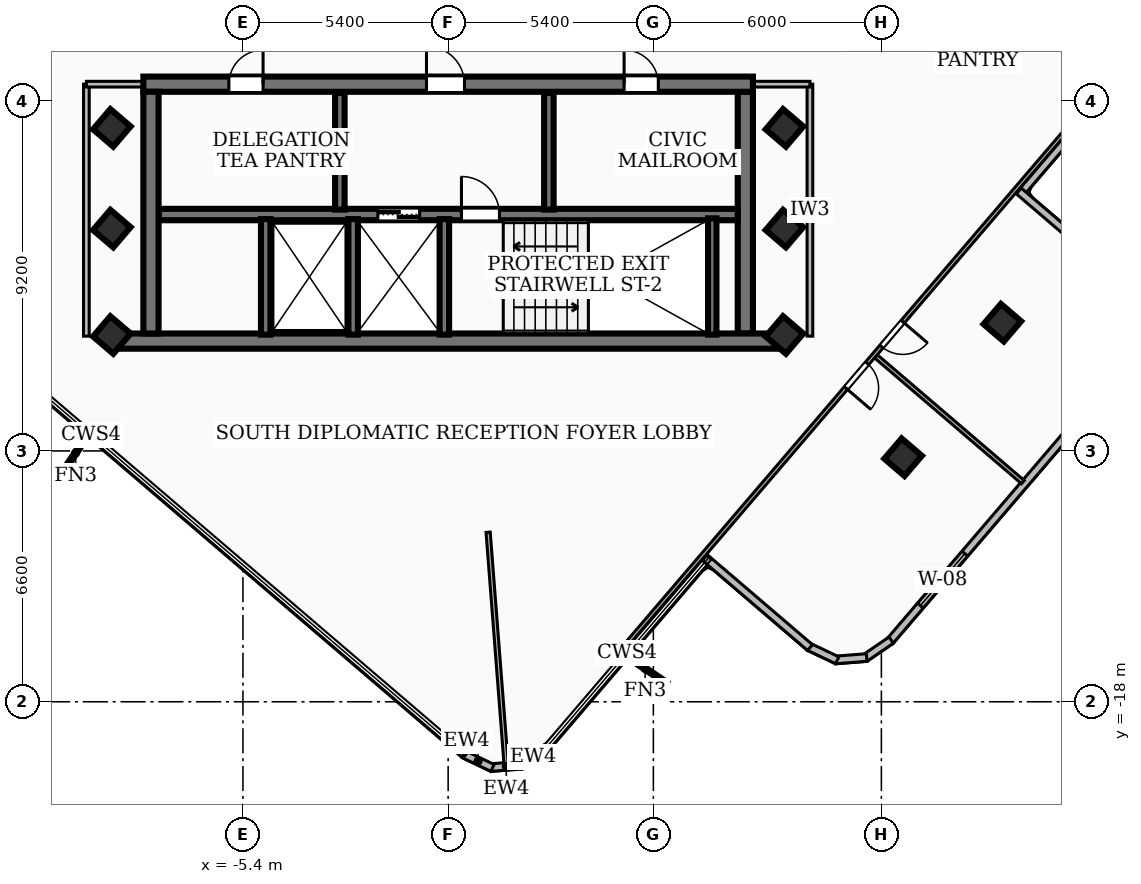
"""IFC4 building model, lengths in metres.
Left out: names, types, materials, properties, quantities, classifications, styles, units other than length and angle.
Written with IfcOpenShell. Run it as: python <this file> out.ifc"""

import sys

from ifc_helpers import new_model, si_unit, direction, frame, frame_2d, origin, origin_2d, place, context, subcontext, project, spatial, rectangle, extrude, element, fill, save


model = new_model("IFC4")
c1 = context("Model", 3, precision=1e-05, world=origin(), true_north=direction((0.0, 1.0)))
c2 = subcontext(c1, "Body", "Model", "MODEL_VIEW")
j1 = project(units=[si_unit("LENGTHUNIT", "METRE"), si_unit("PLANEANGLEUNIT", "RADIAN")], contexts=[c1])
p1 = place(None, origin())
s1 = spatial("IfcSite", under=j1, at=p1, CompositionType="ELEMENT")
p2 = place(p1, origin())
s2 = spatial("IfcBuilding", under=s1, at=p2, CompositionType="ELEMENT")
p3 = place(p2, frame((0.0, 0.0, 250.92)))
s3 = spatial("IfcBuildingStorey", under=s2, at=p3, CompositionType="ELEMENT", Elevation=250.92)
p4 = place(p3, frame((8.78, -8.51, 0.0), z_axis=(0.0, 0.0, 1.0), x_axis=(-1.0, 0.0, 0.0)))
e1 = element("IfcWall", 1, at=p4, inside=s3, PredefinedType="SHEAR", context=c2, shape_type="SweptSolid", body=[
    extrude(rectangle(XDim=17.56, YDim=0.4, at=frame_2d((8.78, 0.0))), origin(), (0.0, 0.0, 1.0), 3.16),
])
p5 = place(p3, frame((-8.02, -1.75, 0.0), z_axis=(0.0, 0.0, 1.0), x_axis=(1.0, 0.0, 0.0)))
e2 = element("IfcWall", 2, at=p5, inside=s3, PredefinedType="SHEAR", context=c2, shape_type="SweptSolid", body=[
    extrude(rectangle(XDim=16.04, YDim=0.4, at=frame_2d((8.02, 0.0))), origin(), (0.0, 0.0, 1.0), 3.16),
])
p6 = place(p5, frame((7.45, 0.0, 0.0)))
e3 = element("IfcOpeningElement", 3, at=p6, cuts=e2, PredefinedType="OPENING", context=c2, shape_type="SweptSolid", body=[
    extrude(rectangle(XDim=1.0, YDim=2.1, at=frame_2d((0.5, 1.05))), frame((0.0, 0.21, 0.0), z_axis=(0.0, -1.0, 0.0), x_axis=(1.0, 0.0, 0.0)), (0.0, 0.0, 1.0), 0.42),
])
p7 = place(p5, frame((12.65, 0.0, 0.0)))
e4 = element("IfcOpeningElement", 4, at=p7, cuts=e2, PredefinedType="OPENING", context=c2, shape_type="SweptSolid", body=[
    extrude(rectangle(XDim=0.9, YDim=2.06, at=frame_2d((0.45, 1.03))), frame((0.0, 0.21, 0.0), z_axis=(0.0, -1.0, 0.0), x_axis=(1.0, 0.0, 0.0)), (0.0, 0.0, 1.0), 0.42),
])
p8 = place(p5, frame((2.25, 0.0, 0.0)))
e5 = element("IfcOpeningElement", 5, at=p8, cuts=e2, PredefinedType="OPENING", context=c2, shape_type="SweptSolid", body=[
    extrude(rectangle(XDim=0.9, YDim=2.06, at=frame_2d((0.45, 1.03))), frame((0.0, 0.21, 0.0), z_axis=(0.0, -1.0, 0.0), x_axis=(1.0, 0.0, 0.0)), (0.0, 0.0, 1.0), 0.42),
])
for number, where, z_axis, x_axis in (
    (6, (-7.82, -8.31, 0.0), (0.0, 0.0, 1.0), (0.0, 1.0, 0.0)),
    (7, (7.82, -1.95, 0.0), (0.0, 0.0, 1.0), (0.0, -1.0, 0.0)),
):
    element("IfcWall", number, at=place(p3, frame(where, z_axis=z_axis, x_axis=x_axis)), inside=s3, PredefinedType="SHEAR", context=c2, shape_type="SweptSolid", body=[
        extrude(rectangle(XDim=6.36, YDim=0.4, at=frame_2d((3.18, 0.0))), origin(), (0.0, 0.0, 1.0), 3.16),
    ])
p9 = place(p3, frame((-7.62, -5.18, 0.0), z_axis=(0.0, 0.0, 1.0), x_axis=(1.0, 0.0, 0.0)))
e8 = element("IfcWall", 8, at=p9, inside=s3, PredefinedType="SOLIDWALL", context=c2, shape_type="SweptSolid", body=[
    extrude(rectangle(XDim=15.24, YDim=0.3, at=frame_2d((7.62, 0.0))), origin(), (0.0, 0.0, 1.0), 3.16),
])
p10 = place(p9, frame((5.77, 0.0, 0.0)))
e9 = element("IfcOpeningElement", 9, at=p10, cuts=e8, PredefinedType="OPENING", context=c2, shape_type="SweptSolid", body=[
    extrude(rectangle(XDim=1.1, YDim=2.15, at=frame_2d((0.55, 1.075))), frame((0.0, 0.16, 0.0), z_axis=(0.0, -1.0, 0.0), x_axis=(1.0, 0.0, 0.0)), (0.0, 0.0, 1.0), 0.32),
])
p11 = place(p9, frame((7.97, 0.0, 0.0)))
e10 = element("IfcOpeningElement", 10, at=p11, cuts=e8, PredefinedType="OPENING", context=c2, shape_type="SweptSolid", body=[
    extrude(rectangle(XDim=1.0, YDim=2.1, at=frame_2d((0.5, 1.05))), frame((0.0, 0.16, 0.0), z_axis=(0.0, -1.0, 0.0), x_axis=(1.0, 0.0, 0.0)), (0.0, 0.0, 1.0), 0.32),
])
p12 = place(p3, frame((6.95, -8.34, 0.0), z_axis=(0.0, 0.0, 1.0), x_axis=(0.0, 1.0, 0.0)))
e11 = element("IfcWall", 11, at=p12, inside=s3, PredefinedType="SOLIDWALL", context=c2, shape_type="SweptSolid", body=[
    extrude(rectangle(XDim=3.06, YDim=0.22, at=frame_2d((1.53, 0.0))), origin(), (0.0, 0.0, 1.0), 3.16),
])
for number, where, z_axis, x_axis in (
    (12, (-0.1, -8.34, 0.0), (0.0, 0.0, 1.0), (0.0, 1.0, 0.0)),
    (13, (-2.5, -8.34, 0.0), (0.0, 0.0, 1.0), (0.0, 1.0, 0.0)),
    (14, (-4.8, -8.34, 0.0), (0.0, 0.0, 1.0), (0.0, 1.0, 0.0)),
):
    element("IfcWall", number, at=place(p3, frame(where, z_axis=z_axis, x_axis=x_axis)), inside=s3, PredefinedType="SOLIDWALL", context=c2, shape_type="SweptSolid", body=[
        extrude(rectangle(XDim=3.04, YDim=0.25, at=frame_2d((1.52, 0.0))), origin(), (0.0, 0.0, 1.0), 3.16),
    ])
for number, where, z_axis, x_axis in (
    (15, (-2.85, -5.05, 0.0), (0.0, 0.0, 1.0), (0.0, 1.0, 0.0)),
    (16, (2.65, -5.05, 0.0), (0.0, 0.0, 1.0), (0.0, 1.0, 0.0)),
):
    element("IfcWall", number, at=place(p3, frame(where, z_axis=z_axis, x_axis=x_axis)), inside=s3, PredefinedType="SOLIDWALL", context=c2, shape_type="SweptSolid", body=[
        extrude(rectangle(XDim=3.07, YDim=0.25, at=frame_2d((1.535, 0.0))), origin(), (0.0, 0.0, 1.0), 3.16),
    ])
for number, where, z_axis, x_axis in (
    (17, (-8.85, -5.55, 0.0), (0.0, 0.0, 1.0), (0.65, 0.76, 0.0)),
    (18, (-8.85, -2.9, 0.0), (0.0, 0.0, 1.0), (0.65, 0.76, 0.0)),
    (19, (8.85, -5.55, 0.0), (0.0, 0.0, 1.0), (0.65, 0.76, 0.0)),
    (20, (8.85, -2.9, 0.0), (0.0, 0.0, 1.0), (0.65, 0.76, 0.0)),
    (21, (8.85, -8.35, 0.0), (0.0, 0.0, 1.0), (0.65, 0.76, 0.0)),
    (22, (-8.85, -8.35, 0.0), (0.0, 0.0, 1.0), (0.65, 0.76, 0.0)),
    (23, (11.971, -11.566, 0.0), (0.0, 0.0, 1.0), (0.65, 0.76, 0.0)),
    (24, (14.583, -8.026, 0.0), (0.0, 0.0, 1.0), (0.65, 0.76, 0.0)),
):
    element("IfcColumn", number, at=place(p3, frame(where, z_axis=z_axis, x_axis=x_axis)), inside=s3, PredefinedType="COLUMN", context=c2, shape_type="SweptSolid", body=[
        extrude(rectangle(XDim=0.7, YDim=0.7, at=origin_2d()), origin(), (0.0, 0.0, 1.0), 3.42),
    ])
p13 = place(p3, frame((2.587, -19.21, 0.0), z_axis=(0.0, 0.0, 1.0), x_axis=(-0.824907237821, -0.565268121329, 0.0)))
e25 = element("IfcWall", 25, at=p13, inside=s3, PredefinedType="SOLIDWALL", context=c2, shape_type="SweptSolid", body=[
    extrude(rectangle(XDim=0.839, YDim=0.2, at=frame_2d((0.419, 0.0))), origin(), (0.0, 0.0, 1.0), 3.16),
])
p14 = place(p3, frame((1.941, -19.668, 0.0), z_axis=(0.0, 0.0, 1.0), x_axis=(-0.996986164412, -0.077579558977, 0.0)))
e26 = element("IfcWall", 26, at=p14, inside=s3, PredefinedType="SOLIDWALL", context=c2, shape_type="SweptSolid", body=[
    extrude(rectangle(XDim=0.824, YDim=0.2, at=frame_2d((0.412, 0.0))), origin(), (0.0, 0.0, 1.0), 3.16),
])
p15 = place(p3, frame((1.167, -19.741, 0.0), z_axis=(0.0, 0.0, 1.0), x_axis=(-0.902360330408, 0.430982405796, 0.0)))
e27 = element("IfcWall", 27, at=p15, inside=s3, PredefinedType="SOLIDWALL", context=c2, shape_type="SweptSolid", body=[
    extrude(rectangle(XDim=0.84, YDim=0.2, at=frame_2d((0.42, 0.0))), origin(), (0.0, 0.0, 1.0), 3.16),
])
p16 = place(p3, frame((19.406, 0.451, 0.0), z_axis=(0.0, 0.0, 1.0), x_axis=(-0.650185720357, -0.759775314842, 0.0)))
e28 = element("IfcWall", 28, at=p16, inside=s3, PredefinedType="SOLIDWALL", context=c2, shape_type="SweptSolid", body=[
    extrude(rectangle(XDim=6.741, YDim=0.2, at=frame_2d((3.371, 0.0))), origin(), (0.0, 0.0, 1.0), 3.16),
])
p17 = place(p3, frame((15.014, -4.558, 0.0), z_axis=(0.0, 0.0, 1.0), x_axis=(0.759781598798, -0.650178377161, 0.0)))
e29 = element("IfcWall", 29, at=p17, inside=s3, PredefinedType="SOLIDWALL", context=c2, shape_type="SweptSolid", body=[
    extrude(rectangle(XDim=3.642, YDim=0.2, at=frame_2d((1.821, 0.0))), origin(), (0.0, 0.0, 1.0), 3.16),
])
p18 = place(p3, frame((17.943, -9.024, 0.0), z_axis=(0.0, 0.0, 1.0), x_axis=(-0.650218389303, -0.759747356831, 0.0)))
e30 = element("IfcWall", 30, at=p18, inside=s3, PredefinedType="SOLIDWALL", context=c2, shape_type="SweptSolid", body=[
    extrude(rectangle(XDim=9.723, YDim=0.2, at=frame_2d((4.861, 0.0))), origin(), (0.0, 0.0, 1.0), 3.16),
])
p19 = place(p18, frame((6.684, 0.0, 0.85)))
e31 = element("IfcOpeningElement", 31, at=p19, cuts=e30, PredefinedType="OPENING", context=c2, shape_type="SweptSolid", body=[
    extrude(rectangle(XDim=1.8, YDim=1.8, at=frame_2d((0.9, 0.9))), frame((0.0, 0.11, 0.0), z_axis=(0.0, -1.0, 0.0), x_axis=(1.0, 0.0, 0.0)), (0.0, 0.0, 1.0), 0.22),
])
p20 = place(p3, frame((11.658, -16.378, 0.0), z_axis=(0.0, 0.0, 1.0), x_axis=(-0.824907237821, -0.565268121329, 0.0)))
e32 = element("IfcWall", 32, at=p20, inside=s3, PredefinedType="SOLIDWALL", context=c2, shape_type="SweptSolid", body=[
    extrude(rectangle(XDim=0.839, YDim=0.2, at=frame_2d((0.419, 0.0))), origin(), (0.0, 0.0, 1.0), 3.16),
])
p21 = place(p3, frame((11.012, -16.836, 0.0), z_axis=(0.0, 0.0, 1.0), x_axis=(-0.996986164412, -0.077579558977, 0.0)))
e33 = element("IfcWall", 33, at=p21, inside=s3, PredefinedType="SOLIDWALL", context=c2, shape_type="SweptSolid", body=[
    extrude(rectangle(XDim=0.824, YDim=0.2, at=frame_2d((0.412, 0.0))), origin(), (0.0, 0.0, 1.0), 3.16),
])
p22 = place(p3, frame((10.238, -16.909, 0.0), z_axis=(0.0, 0.0, 1.0), x_axis=(-0.902473334209, 0.430745726666, 0.0)))
e34 = element("IfcWall", 34, at=p22, inside=s3, PredefinedType="SOLIDWALL", context=c2, shape_type="SweptSolid", body=[
    extrude(rectangle(XDim=0.84, YDim=0.2, at=frame_2d((0.42, 0.0))), origin(), (0.0, 0.0, 1.0), 3.16),
])
p23 = place(p3, frame((9.522, -16.574, 0.0), z_axis=(0.0, 0.0, 1.0), x_axis=(-0.759914066759, 0.650023546606, 0.0)))
e35 = element("IfcWall", 35, at=p23, inside=s3, PredefinedType="SOLIDWALL", context=c2, shape_type="SweptSolid", body=[
    extrude(rectangle(XDim=3.641, YDim=0.2, at=frame_2d((1.821, 0.0))), origin(), (0.0, 0.0, 1.0), 3.16),
])
p24 = place(p3, frame((-9.52, -8.38, 0.0), z_axis=(0.0, 0.0, 1.0), x_axis=(0.0, 1.0, 0.0)))
e36 = element("IfcWall", 36, at=p24, inside=s3, PredefinedType="PARTITIONING", context=c2, shape_type="SweptSolid", body=[
    extrude(rectangle(XDim=6.63, YDim=0.15, at=frame_2d((3.315, 0.0))), origin(), (0.0, 0.0, 1.0), 3.16),
])
p25 = place(p3, frame((-7.85, -1.75, 0.0), z_axis=(0.0, 0.0, 1.0), x_axis=(-1.0, 0.0, 0.0)))
e37 = element("IfcWall", 37, at=p25, inside=s3, PredefinedType="PARTITIONING", context=c2, shape_type="SweptSolid", body=[
    extrude(rectangle(XDim=1.67, YDim=0.15, at=frame_2d((0.835, 0.0))), origin(), (0.0, 0.0, 1.0), 2.39),
])
p26 = place(p3, frame((9.52, -8.38, 0.0), z_axis=(0.0, 0.0, 1.0), x_axis=(0.0, 1.0, 0.0)))
e38 = element("IfcWall", 38, at=p26, inside=s3, PredefinedType="PARTITIONING", context=c2, shape_type="SweptSolid", body=[
    extrude(rectangle(XDim=6.63, YDim=0.15, at=frame_2d((3.315, 0.0))), origin(), (0.0, 0.0, 1.0), 2.53),
])
p27 = place(p3, frame((7.85, -1.75, 0.0), z_axis=(0.0, 0.0, 1.0), x_axis=(1.0, 0.0, 0.0)))
e39 = element("IfcWall", 39, at=p27, inside=s3, PredefinedType="PARTITIONING", context=c2, shape_type="SweptSolid", body=[
    extrude(rectangle(XDim=1.67, YDim=0.15, at=frame_2d((0.835, 0.0))), origin(), (0.0, 0.0, 1.0), 2.39),
])
p28 = place(p3, frame((1.052, -13.54, 0.0), z_axis=(0.0, 0.0, 1.0), x_axis=(0.077356131702, -0.997003525013, 0.0)))
e40 = element("IfcWall", 40, at=p28, inside=s3, PredefinedType="PARTITIONING", context=c2, shape_type="SweptSolid", body=[
    extrude(rectangle(XDim=6.113, YDim=0.11, at=frame_2d((3.057, 0.0))), origin(), (0.0, 0.0, 1.0), 3.16),
])
p29 = place(p3, frame((11.26, -8.913, 0.0), z_axis=(0.0, 0.0, 1.0), x_axis=(0.759673292451, -0.650304919816, 0.0)))
e41 = element("IfcWall", 41, at=p29, inside=s3, PredefinedType="PARTITIONING", context=c2, shape_type="SweptSolid", body=[
    extrude(rectangle(XDim=5.085, YDim=0.11, at=frame_2d((2.542, 0.0))), origin(), (0.0, 0.0, 1.0), 3.16),
])
p30 = place(p3, frame((17.437, -1.604, 0.0), z_axis=(0.0, 0.0, 1.0), x_axis=(-0.650265099033, -0.759707378522, 0.0)))
e42 = element("IfcWall", 42, at=p30, inside=s3, PredefinedType="PARTITIONING", context=c2, shape_type="SweptSolid", body=[
    extrude(rectangle(XDim=20.139, YDim=0.11, at=frame_2d((10.07, 0.0))), origin(), (0.0, 0.0, 1.0), 2.53),
])
p31 = place(p30, frame((9.859, 0.0, 0.0)))
e43 = element("IfcOpeningElement", 43, at=p31, cuts=e42, PredefinedType="OPENING", context=c2, shape_type="SweptSolid", body=[
    extrude(rectangle(XDim=0.86, YDim=2.04, at=frame_2d((0.43, 1.02))), frame((0.0, 0.065, 0.0), z_axis=(0.0, -1.0, 0.0), x_axis=(1.0, 0.0, 0.0)), (0.0, 0.0, 1.0), 0.13),
])
p32 = place(p30, frame((8.419, 0.0, 0.0)))
e44 = element("IfcOpeningElement", 44, at=p32, cuts=e42, PredefinedType="OPENING", context=c2, shape_type="SweptSolid", body=[
    extrude(rectangle(XDim=0.86, YDim=2.04, at=frame_2d((0.43, 1.02))), frame((0.0, 0.065, 0.0), z_axis=(0.0, -1.0, 0.0), x_axis=(1.0, 0.0, 0.0)), (0.0, 0.0, 1.0), 0.13),
])
p33 = place(p19, origin())
e45 = element("IfcWindow", 45, at=p33, inside=s3, PartitioningType="SINGLE_PANEL", PredefinedType="WINDOW", context=c2, shape_type="SweptSolid", body=[
    extrude(rectangle(XDim=1.8, YDim=1.8, at=frame_2d((0.9, 0.9))), frame((0.0, 0.03, 0.0), z_axis=(0.0, -1.0, 0.0), x_axis=(1.0, 0.0, 0.0)), (0.0, 0.0, 1.0), 0.06),
])
fill(e31, e45)
p34 = place(p6, origin())
e46 = element("IfcDoor", 46, at=p34, inside=s3, OperationType="SINGLE_SWING_LEFT", PredefinedType="DOOR", context=c2, shape_type="SweptSolid", body=[
    extrude(rectangle(XDim=1.0, YDim=2.1, at=frame_2d((0.5, 1.05))), frame((0.0, 0.025, 0.0), z_axis=(0.0, -1.0, 0.0), x_axis=(1.0, 0.0, 0.0)), (0.0, 0.0, 1.0), 0.05),
])
fill(e3, e46)
p35 = place(p10, origin())
e47 = element("IfcDoor", 47, at=p35, inside=s3, OperationType="DOUBLE_DOOR_SLIDING", PredefinedType="DOOR", context=c2, shape_type="SweptSolid", body=[
    extrude(rectangle(XDim=1.1, YDim=2.15, at=frame_2d((0.55, 1.075))), frame((0.0, 0.025, 0.0), z_axis=(0.0, -1.0, 0.0), x_axis=(1.0, 0.0, 0.0)), (0.0, 0.0, 1.0), 0.05),
])
fill(e9, e47)
p36 = place(p11, origin())
e48 = element("IfcDoor", 48, at=p36, inside=s3, OperationType="SINGLE_SWING_LEFT", PredefinedType="DOOR", context=c2, shape_type="SweptSolid", body=[
    extrude(rectangle(XDim=1.0, YDim=2.1, at=frame_2d((0.5, 1.05))), frame((0.0, 0.025, 0.0), z_axis=(0.0, -1.0, 0.0), x_axis=(1.0, 0.0, 0.0)), (0.0, 0.0, 1.0), 0.05),
])
fill(e10, e48)
p37 = place(p7, origin())
e49 = element("IfcDoor", 49, at=p37, inside=s3, OperationType="SINGLE_SWING_LEFT", PredefinedType="DOOR", context=c2, shape_type="SweptSolid", body=[
    extrude(rectangle(XDim=0.9, YDim=2.06, at=frame_2d((0.45, 1.03))), frame((0.0, 0.025, 0.0), z_axis=(0.0, -1.0, 0.0), x_axis=(1.0, 0.0, 0.0)), (0.0, 0.0, 1.0), 0.05),
])
fill(e4, e49)
p38 = place(p8, origin())
e50 = element("IfcDoor", 50, at=p38, inside=s3, OperationType="SINGLE_SWING_RIGHT", PredefinedType="DOOR", context=c2, shape_type="SweptSolid", body=[
    extrude(rectangle(XDim=0.9, YDim=2.06, at=frame_2d((0.45, 1.03))), frame((0.0, 0.025, 0.0), z_axis=(0.0, -1.0, 0.0), x_axis=(1.0, 0.0, 0.0)), (0.0, 0.0, 1.0), 0.05),
])
fill(e5, e50)
p39 = place(p31, origin())
e51 = element("IfcDoor", 51, at=p39, inside=s3, OperationType="SINGLE_SWING_RIGHT", PredefinedType="DOOR", context=c2, shape_type="SweptSolid", body=[
    extrude(rectangle(XDim=0.86, YDim=2.04, at=frame_2d((0.43, 1.02))), frame((0.0, 0.025, 0.0), z_axis=(0.0, -1.0, 0.0), x_axis=(1.0, 0.0, 0.0)), (0.0, 0.0, 1.0), 0.05),
])
fill(e43, e51)
p40 = place(p32, origin())
e52 = element("IfcDoor", 52, at=p40, inside=s3, OperationType="SINGLE_SWING_LEFT", PredefinedType="DOOR", context=c2, shape_type="SweptSolid", body=[
    extrude(rectangle(XDim=0.86, YDim=2.04, at=frame_2d((0.43, 1.02))), frame((0.0, 0.025, 0.0), z_axis=(0.0, -1.0, 0.0), x_axis=(1.0, 0.0, 0.0)), (0.0, 0.0, 1.0), 0.05),
])
fill(e44, e52)
save(model, sys.argv[1])
